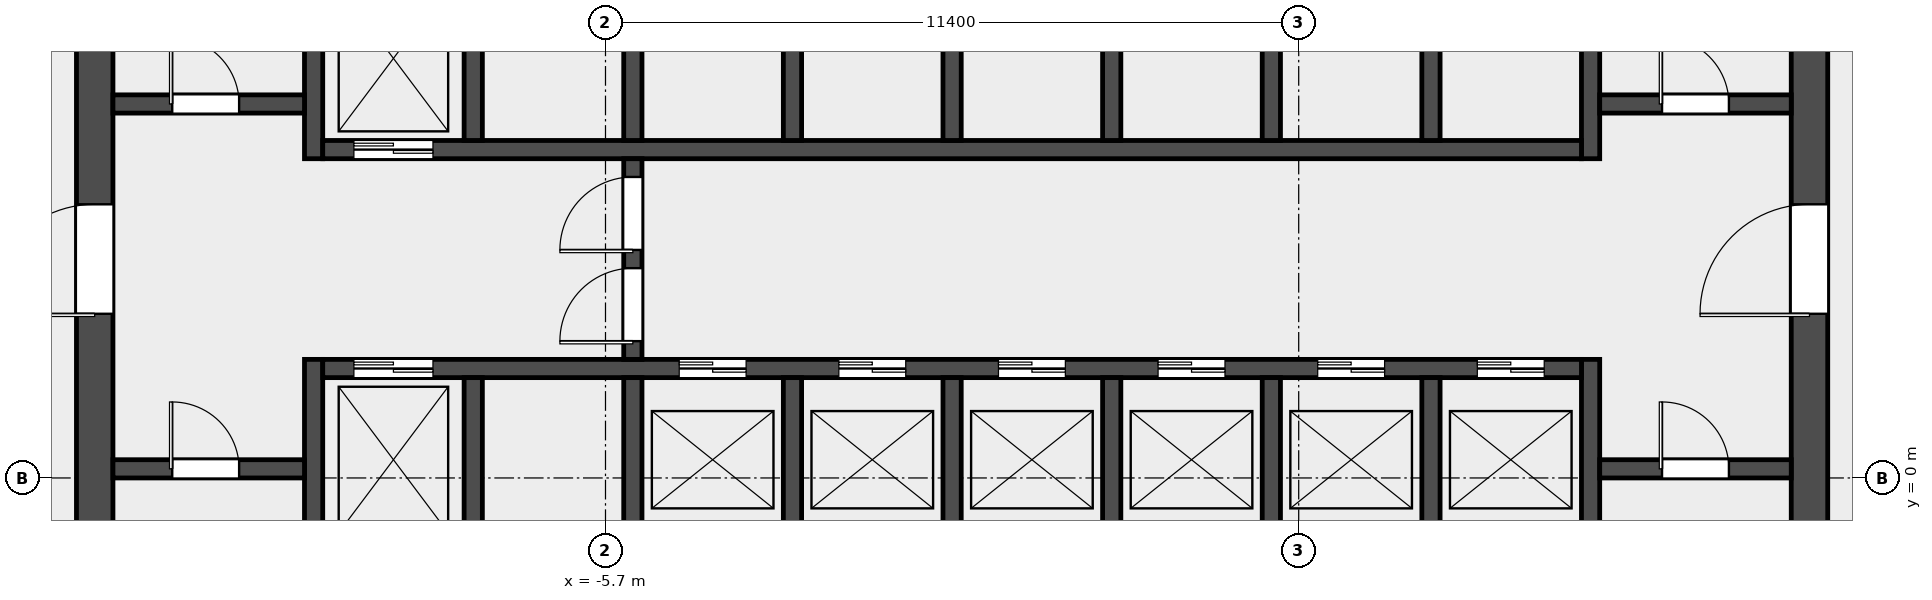
"""IFC4 building model, lengths in metres.
Left out: names, types, materials, properties, quantities, classifications, styles, units other than length and angle.
Written with IfcOpenShell. Run it as: python <this file> out.ifc"""

import sys

from ifc_helpers import new_model, si_unit, direction, frame, frame_2d, origin, place, context, subcontext, project, spatial, rectangle, extrude, element, fill, save


model = new_model("IFC4")
c1 = context("Model", 3, precision=1e-05, world=origin(), true_north=direction((0.0, 1.0)))
c2 = subcontext(c1, "Body", "Model", "MODEL_VIEW")
j1 = project(units=[si_unit("LENGTHUNIT", "METRE"), si_unit("PLANEANGLEUNIT", "RADIAN")], contexts=[c1])
p1 = place(None, origin())
s1 = spatial("IfcSite", under=j1, at=p1, CompositionType="ELEMENT")
p2 = place(p1, origin())
s2 = spatial("IfcBuilding", under=s1, at=p2, CompositionType="ELEMENT")
p3 = place(p2, frame((0.0, 0.0, 59.8)))
s3 = spatial("IfcBuildingStorey", under=s2, at=p3, CompositionType="ELEMENT", Elevation=59.8)
p4 = place(p3, frame((-14.1, -6.6, 0.0), z_axis=(0.0, 0.0, 1.0), x_axis=(0.0, 1.0, 0.0)))
e1 = element("IfcWall", 1, at=p4, inside=s3, PredefinedType="SHEAR", context=c2, shape_type="SweptSolid", body=[
    extrude(rectangle(XDim=19.5, YDim=0.6, at=frame_2d((9.75, 0.0))), origin(), (0.0, 0.0, 1.0), 4.5),
])
p5 = place(p4, frame((9.3, 0.0, 0.0)))
e2 = element("IfcOpeningElement", 2, at=p5, cuts=e1, PredefinedType="OPENING", context=c2, shape_type="SweptSolid", body=[
    extrude(rectangle(XDim=1.8, YDim=2.1, at=frame_2d((0.9, 1.05))), frame((0.0, 0.312, 0.0), z_axis=(0.0, -1.0, 0.0), x_axis=(1.0, 0.0, 0.0)), (0.0, 0.0, 1.0), 0.624),
])
p6 = place(p3, frame((14.1, -6.6, 0.0), z_axis=(0.0, 0.0, 1.0), x_axis=(0.0, 1.0, 0.0)))
e3 = element("IfcWall", 3, at=p6, inside=s3, PredefinedType="SHEAR", context=c2, shape_type="SweptSolid", body=[
    extrude(rectangle(XDim=19.5, YDim=0.6, at=frame_2d((9.75, 0.0))), origin(), (0.0, 0.0, 1.0), 4.5),
])
p7 = place(p6, frame((9.3, 0.0, 0.0)))
e4 = element("IfcOpeningElement", 4, at=p7, cuts=e3, PredefinedType="OPENING", context=c2, shape_type="SweptSolid", body=[
    extrude(rectangle(XDim=1.8, YDim=2.1, at=frame_2d((0.9, 1.05))), frame((0.0, 0.312, 0.0), z_axis=(0.0, -1.0, 0.0), x_axis=(1.0, 0.0, 0.0)), (0.0, 0.0, 1.0), 0.624),
])
p8 = place(p3, frame((-10.5, -6.6, 0.0), z_axis=(0.0, 0.0, 1.0), x_axis=(0.0, 1.0, 0.0)))
e5 = element("IfcWall", 5, at=p8, inside=s3, PredefinedType="SHEAR", context=c2, shape_type="SweptSolid", body=[
    extrude(rectangle(XDim=8.55, YDim=0.3, at=frame_2d((4.275, 0.0))), origin(), (0.0, 0.0, 1.0), 4.5),
])
p9 = place(p3, frame((-10.5, 5.25, 0.0), z_axis=(0.0, 0.0, 1.0), x_axis=(0.0, 1.0, 0.0)))
e6 = element("IfcWall", 6, at=p9, inside=s3, PredefinedType="SHEAR", context=c2, shape_type="SweptSolid", body=[
    extrude(rectangle(XDim=7.65, YDim=0.3, at=frame_2d((3.825, 0.0))), origin(), (0.0, 0.0, 1.0), 4.5),
])
p10 = place(p3, frame((10.5, -6.6, 0.0), z_axis=(0.0, 0.0, 1.0), x_axis=(0.0, 1.0, 0.0)))
e7 = element("IfcWall", 7, at=p10, inside=s3, PredefinedType="SHEAR", context=c2, shape_type="SweptSolid", body=[
    extrude(rectangle(XDim=8.55, YDim=0.3, at=frame_2d((4.275, 0.0))), origin(), (0.0, 0.0, 1.0), 4.5),
])
p11 = place(p3, frame((10.5, 5.25, 0.0), z_axis=(0.0, 0.0, 1.0), x_axis=(0.0, 1.0, 0.0)))
e8 = element("IfcWall", 8, at=p11, inside=s3, PredefinedType="SHEAR", context=c2, shape_type="SweptSolid", body=[
    extrude(rectangle(XDim=7.65, YDim=0.3, at=frame_2d((3.825, 0.0))), origin(), (0.0, 0.0, 1.0), 4.5),
])
p12 = place(p3, frame((-13.8, 0.15, 0.0), z_axis=(0.0, 0.0, 1.0), x_axis=(1.0, 0.0, 0.0)))
e9 = element("IfcWall", 9, at=p12, inside=s3, PredefinedType="SOLIDWALL", context=c2, shape_type="SweptSolid", body=[
    extrude(rectangle(XDim=3.15, YDim=0.3, at=frame_2d((1.575, 0.0))), origin(), (0.0, 0.0, 1.0), 4.5),
])
p13 = place(p12, frame((0.975, 0.0, 0.0)))
e10 = element("IfcOpeningElement", 10, at=p13, cuts=e9, PredefinedType="OPENING", context=c2, shape_type="SweptSolid", body=[
    extrude(rectangle(XDim=1.1, YDim=2.1, at=frame_2d((0.55, 1.05))), frame((0.0, 0.162, 0.0), z_axis=(0.0, -1.0, 0.0), x_axis=(1.0, 0.0, 0.0)), (0.0, 0.0, 1.0), 0.324),
])
p14 = place(p3, frame((-13.8, 6.15, 0.0), z_axis=(0.0, 0.0, 1.0), x_axis=(1.0, 0.0, 0.0)))
e11 = element("IfcWall", 11, at=p14, inside=s3, PredefinedType="SOLIDWALL", context=c2, shape_type="SweptSolid", body=[
    extrude(rectangle(XDim=3.15, YDim=0.3, at=frame_2d((1.575, 0.0))), origin(), (0.0, 0.0, 1.0), 4.5),
])
p15 = place(p14, frame((0.975, 0.0, 0.0)))
e12 = element("IfcOpeningElement", 12, at=p15, cuts=e11, PredefinedType="OPENING", context=c2, shape_type="SweptSolid", body=[
    extrude(rectangle(XDim=1.1, YDim=2.1, at=frame_2d((0.55, 1.05))), frame((0.0, 0.162, 0.0), z_axis=(0.0, -1.0, 0.0), x_axis=(1.0, 0.0, 0.0)), (0.0, 0.0, 1.0), 0.324),
])
p16 = place(p3, frame((10.65, 0.15, 0.0), z_axis=(0.0, 0.0, 1.0), x_axis=(1.0, 0.0, 0.0)))
e13 = element("IfcWall", 13, at=p16, inside=s3, PredefinedType="SOLIDWALL", context=c2, shape_type="SweptSolid", body=[
    extrude(rectangle(XDim=3.15, YDim=0.3, at=frame_2d((1.575, 0.0))), origin(), (0.0, 0.0, 1.0), 4.5),
])
p17 = place(p16, frame((1.025, 0.0, 0.0)))
e14 = element("IfcOpeningElement", 14, at=p17, cuts=e13, PredefinedType="OPENING", context=c2, shape_type="SweptSolid", body=[
    extrude(rectangle(XDim=1.1, YDim=2.1, at=frame_2d((0.55, 1.05))), frame((0.0, 0.162, 0.0), z_axis=(0.0, -1.0, 0.0), x_axis=(1.0, 0.0, 0.0)), (0.0, 0.0, 1.0), 0.324),
])
p18 = place(p3, frame((10.65, 6.15, 0.0), z_axis=(0.0, 0.0, 1.0), x_axis=(1.0, 0.0, 0.0)))
e15 = element("IfcWall", 15, at=p18, inside=s3, PredefinedType="SOLIDWALL", context=c2, shape_type="SweptSolid", body=[
    extrude(rectangle(XDim=3.15, YDim=0.3, at=frame_2d((1.575, 0.0))), origin(), (0.0, 0.0, 1.0), 4.5),
])
p19 = place(p18, frame((1.025, 0.0, 0.0)))
e16 = element("IfcOpeningElement", 16, at=p19, cuts=e15, PredefinedType="OPENING", context=c2, shape_type="SweptSolid", body=[
    extrude(rectangle(XDim=1.1, YDim=2.1, at=frame_2d((0.55, 1.05))), frame((0.0, 0.162, 0.0), z_axis=(0.0, -1.0, 0.0), x_axis=(1.0, 0.0, 0.0)), (0.0, 0.0, 1.0), 0.324),
])
p20 = place(p3, frame((-10.35, 1.8, 0.0), z_axis=(0.0, 0.0, 1.0), x_axis=(1.0, 0.0, 0.0)))
e17 = element("IfcWall", 17, at=p20, inside=s3, PredefinedType="SOLIDWALL", context=c2, shape_type="SweptSolid", body=[
    extrude(rectangle(XDim=20.7, YDim=0.3, at=frame_2d((10.35, 0.0))), origin(), (0.0, 0.0, 1.0), 4.5),
])
p21 = place(p20, frame((0.512, 0.0, 0.0)))
e18 = element("IfcOpeningElement", 18, at=p21, cuts=e17, PredefinedType="OPENING", context=c2, shape_type="SweptSolid", body=[
    extrude(rectangle(XDim=1.3, YDim=2.1, at=frame_2d((0.65, 1.05))), frame((0.0, 0.162, 0.0), z_axis=(0.0, -1.0, 0.0), x_axis=(1.0, 0.0, 0.0)), (0.0, 0.0, 1.0), 0.324),
])
p22 = place(p20, frame((5.863, 0.0, 0.0)))
e19 = element("IfcOpeningElement", 19, at=p22, cuts=e17, PredefinedType="OPENING", context=c2, shape_type="SweptSolid", body=[
    extrude(rectangle(XDim=1.1, YDim=2.1, at=frame_2d((0.55, 1.05))), frame((0.0, 0.162, 0.0), z_axis=(0.0, -1.0, 0.0), x_axis=(1.0, 0.0, 0.0)), (0.0, 0.0, 1.0), 0.324),
])
p23 = place(p20, frame((8.488, 0.0, 0.0)))
e20 = element("IfcOpeningElement", 20, at=p23, cuts=e17, PredefinedType="OPENING", context=c2, shape_type="SweptSolid", body=[
    extrude(rectangle(XDim=1.1, YDim=2.1, at=frame_2d((0.55, 1.05))), frame((0.0, 0.162, 0.0), z_axis=(0.0, -1.0, 0.0), x_axis=(1.0, 0.0, 0.0)), (0.0, 0.0, 1.0), 0.324),
])
p24 = place(p20, frame((11.113, 0.0, 0.0)))
e21 = element("IfcOpeningElement", 21, at=p24, cuts=e17, PredefinedType="OPENING", context=c2, shape_type="SweptSolid", body=[
    extrude(rectangle(XDim=1.1, YDim=2.1, at=frame_2d((0.55, 1.05))), frame((0.0, 0.162, 0.0), z_axis=(0.0, -1.0, 0.0), x_axis=(1.0, 0.0, 0.0)), (0.0, 0.0, 1.0), 0.324),
])
p25 = place(p20, frame((13.738, 0.0, 0.0)))
e22 = element("IfcOpeningElement", 22, at=p25, cuts=e17, PredefinedType="OPENING", context=c2, shape_type="SweptSolid", body=[
    extrude(rectangle(XDim=1.1, YDim=2.1, at=frame_2d((0.55, 1.05))), frame((0.0, 0.162, 0.0), z_axis=(0.0, -1.0, 0.0), x_axis=(1.0, 0.0, 0.0)), (0.0, 0.0, 1.0), 0.324),
])
p26 = place(p20, frame((16.363, 0.0, 0.0)))
e23 = element("IfcOpeningElement", 23, at=p26, cuts=e17, PredefinedType="OPENING", context=c2, shape_type="SweptSolid", body=[
    extrude(rectangle(XDim=1.1, YDim=2.1, at=frame_2d((0.55, 1.05))), frame((0.0, 0.162, 0.0), z_axis=(0.0, -1.0, 0.0), x_axis=(1.0, 0.0, 0.0)), (0.0, 0.0, 1.0), 0.324),
])
p27 = place(p20, frame((18.988, 0.0, 0.0)))
e24 = element("IfcOpeningElement", 24, at=p27, cuts=e17, PredefinedType="OPENING", context=c2, shape_type="SweptSolid", body=[
    extrude(rectangle(XDim=1.1, YDim=2.1, at=frame_2d((0.55, 1.05))), frame((0.0, 0.162, 0.0), z_axis=(0.0, -1.0, 0.0), x_axis=(1.0, 0.0, 0.0)), (0.0, 0.0, 1.0), 0.324),
])
p28 = place(p3, frame((-10.35, 5.4, 0.0), z_axis=(0.0, 0.0, 1.0), x_axis=(1.0, 0.0, 0.0)))
e25 = element("IfcWall", 25, at=p28, inside=s3, PredefinedType="SOLIDWALL", context=c2, shape_type="SweptSolid", body=[
    extrude(rectangle(XDim=20.7, YDim=0.3, at=frame_2d((10.35, 0.0))), origin(), (0.0, 0.0, 1.0), 4.5),
])
p29 = place(p28, frame((0.512, 0.0, 0.0)))
e26 = element("IfcOpeningElement", 26, at=p29, cuts=e25, PredefinedType="OPENING", context=c2, shape_type="SweptSolid", body=[
    extrude(rectangle(XDim=1.3, YDim=2.1, at=frame_2d((0.65, 1.05))), frame((0.0, 0.162, 0.0), z_axis=(0.0, -1.0, 0.0), x_axis=(1.0, 0.0, 0.0)), (0.0, 0.0, 1.0), 0.324),
])
for number, where, z_axis, x_axis in (
    (27, (-7.875, -1.05, 0.0), (0.0, 0.0, 1.0), (0.0, 1.0, 0.0)),
    (28, (-5.25, -1.05, 0.0), (0.0, 0.0, 1.0), (0.0, 1.0, 0.0)),
    (29, (-2.625, -1.05, 0.0), (0.0, 0.0, 1.0), (0.0, 1.0, 0.0)),
    (30, (0.0, -1.05, 0.0), (0.0, 0.0, 1.0), (0.0, 1.0, 0.0)),
    (31, (2.625, -1.05, 0.0), (0.0, 0.0, 1.0), (0.0, 1.0, 0.0)),
    (32, (5.25, -1.05, 0.0), (0.0, 0.0, 1.0), (0.0, 1.0, 0.0)),
    (33, (7.875, -1.05, 0.0), (0.0, 0.0, 1.0), (0.0, 1.0, 0.0)),
    (34, (-7.875, 5.55, 0.0), (0.0, 0.0, 1.0), (0.0, 1.0, 0.0)),
    (35, (-5.25, 5.55, 0.0), (0.0, 0.0, 1.0), (0.0, 1.0, 0.0)),
    (36, (-2.625, 5.55, 0.0), (0.0, 0.0, 1.0), (0.0, 1.0, 0.0)),
    (37, (0.0, 5.55, 0.0), (0.0, 0.0, 1.0), (0.0, 1.0, 0.0)),
    (38, (2.625, 5.55, 0.0), (0.0, 0.0, 1.0), (0.0, 1.0, 0.0)),
    (39, (5.25, 5.55, 0.0), (0.0, 0.0, 1.0), (0.0, 1.0, 0.0)),
    (40, (7.875, 5.55, 0.0), (0.0, 0.0, 1.0), (0.0, 1.0, 0.0)),
):
    element("IfcWall", number, at=place(p3, frame(where, z_axis=z_axis, x_axis=x_axis)), inside=s3, PredefinedType="SOLIDWALL", context=c2, shape_type="SweptSolid", body=[
        extrude(rectangle(XDim=2.7, YDim=0.3, at=frame_2d((1.35, 0.0))), origin(), (0.0, 0.0, 1.0), 4.5),
    ])
p30 = place(p3, frame((-5.25, 1.95, 0.0), z_axis=(0.0, 0.0, 1.0), x_axis=(0.0, 1.0, 0.0)))
e41 = element("IfcWall", 41, at=p30, inside=s3, PredefinedType="SOLIDWALL", context=c2, shape_type="SweptSolid", body=[
    extrude(rectangle(XDim=3.3, YDim=0.3, at=frame_2d((1.65, 0.0))), origin(), (0.0, 0.0, 1.0), 4.5),
])
p31 = place(p30, frame((0.3, 0.0, 0.0)))
e42 = element("IfcOpeningElement", 42, at=p31, cuts=e41, PredefinedType="OPENING", context=c2, shape_type="SweptSolid", body=[
    extrude(rectangle(XDim=1.2, YDim=2.1, at=frame_2d((0.6, 1.05))), frame((0.0, 0.162, 0.0), z_axis=(0.0, -1.0, 0.0), x_axis=(1.0, 0.0, 0.0)), (0.0, 0.0, 1.0), 0.324),
])
p32 = place(p30, frame((1.8, 0.0, 0.0)))
e43 = element("IfcOpeningElement", 43, at=p32, cuts=e41, PredefinedType="OPENING", context=c2, shape_type="SweptSolid", body=[
    extrude(rectangle(XDim=1.2, YDim=2.1, at=frame_2d((0.6, 1.05))), frame((0.0, 0.162, 0.0), z_axis=(0.0, -1.0, 0.0), x_axis=(1.0, 0.0, 0.0)), (0.0, 0.0, 1.0), 0.324),
])
p33 = place(p13, origin())
e44 = element("IfcDoor", 44, at=p33, inside=s3, OperationType="SINGLE_SWING_LEFT", PredefinedType="DOOR", context=c2, shape_type="SweptSolid", body=[
    extrude(rectangle(XDim=1.1, YDim=2.1, at=frame_2d((0.55, 1.05))), frame((0.0, 0.025, 0.0), z_axis=(0.0, -1.0, 0.0), x_axis=(1.0, 0.0, 0.0)), (0.0, 0.0, 1.0), 0.05),
])
fill(e10, e44)
p34 = place(p15, origin())
e45 = element("IfcDoor", 45, at=p34, inside=s3, OperationType="SINGLE_SWING_LEFT", PredefinedType="DOOR", context=c2, shape_type="SweptSolid", body=[
    extrude(rectangle(XDim=1.1, YDim=2.1, at=frame_2d((0.55, 1.05))), frame((0.0, 0.025, 0.0), z_axis=(0.0, -1.0, 0.0), x_axis=(1.0, 0.0, 0.0)), (0.0, 0.0, 1.0), 0.05),
])
fill(e12, e45)
p35 = place(p17, origin())
e46 = element("IfcDoor", 46, at=p35, inside=s3, OperationType="SINGLE_SWING_RIGHT", PredefinedType="DOOR", context=c2, shape_type="SweptSolid", body=[
    extrude(rectangle(XDim=1.1, YDim=2.1, at=frame_2d((0.55, 1.05))), frame((0.0, 0.025, 0.0), z_axis=(0.0, -1.0, 0.0), x_axis=(1.0, 0.0, 0.0)), (0.0, 0.0, 1.0), 0.05),
])
fill(e14, e46)
p36 = place(p19, origin())
e47 = element("IfcDoor", 47, at=p36, inside=s3, OperationType="SINGLE_SWING_RIGHT", PredefinedType="DOOR", context=c2, shape_type="SweptSolid", body=[
    extrude(rectangle(XDim=1.1, YDim=2.1, at=frame_2d((0.55, 1.05))), frame((0.0, 0.025, 0.0), z_axis=(0.0, -1.0, 0.0), x_axis=(1.0, 0.0, 0.0)), (0.0, 0.0, 1.0), 0.05),
])
fill(e16, e47)
p37 = place(p5, origin())
e48 = element("IfcDoor", 48, at=p37, inside=s3, OperationType="DOUBLE_DOOR_SINGLE_SWING", PredefinedType="DOOR", context=c2, shape_type="SweptSolid", body=[
    extrude(rectangle(XDim=1.8, YDim=2.1, at=frame_2d((0.9, 1.05))), frame((0.0, 0.025, 0.0), z_axis=(0.0, -1.0, 0.0), x_axis=(1.0, 0.0, 0.0)), (0.0, 0.0, 1.0), 0.05),
])
fill(e2, e48)
p38 = place(p7, origin())
e49 = element("IfcDoor", 49, at=p38, inside=s3, OperationType="DOUBLE_DOOR_SINGLE_SWING", PredefinedType="DOOR", context=c2, shape_type="SweptSolid", body=[
    extrude(rectangle(XDim=1.8, YDim=2.1, at=frame_2d((0.9, 1.05))), frame((0.0, 0.025, 0.0), z_axis=(0.0, -1.0, 0.0), x_axis=(1.0, 0.0, 0.0)), (0.0, 0.0, 1.0), 0.05),
])
fill(e4, e49)
p39 = place(p31, origin())
e50 = element("IfcDoor", 50, at=p39, inside=s3, OperationType="SINGLE_SWING_LEFT", PredefinedType="DOOR", context=c2, shape_type="SweptSolid", body=[
    extrude(rectangle(XDim=1.2, YDim=2.1, at=frame_2d((0.6, 1.05))), frame((0.0, 0.025, 0.0), z_axis=(0.0, -1.0, 0.0), x_axis=(1.0, 0.0, 0.0)), (0.0, 0.0, 1.0), 0.05),
])
fill(e42, e50)
p40 = place(p32, origin())
e51 = element("IfcDoor", 51, at=p40, inside=s3, OperationType="SINGLE_SWING_RIGHT", PredefinedType="DOOR", context=c2, shape_type="SweptSolid", body=[
    extrude(rectangle(XDim=1.2, YDim=2.1, at=frame_2d((0.6, 1.05))), frame((0.0, 0.025, 0.0), z_axis=(0.0, -1.0, 0.0), x_axis=(1.0, 0.0, 0.0)), (0.0, 0.0, 1.0), 0.05),
])
fill(e43, e51)
p41 = place(p21, origin())
e52 = element("IfcDoor", 52, at=p41, inside=s3, OperationType="DOUBLE_DOOR_SLIDING", PredefinedType="DOOR", context=c2, shape_type="SweptSolid", body=[
    extrude(rectangle(XDim=1.3, YDim=2.1, at=frame_2d((0.65, 1.05))), frame((0.0, 0.025, 0.0), z_axis=(0.0, -1.0, 0.0), x_axis=(1.0, 0.0, 0.0)), (0.0, 0.0, 1.0), 0.05),
])
fill(e18, e52)
p42 = place(p22, origin())
e53 = element("IfcDoor", 53, at=p42, inside=s3, OperationType="DOUBLE_DOOR_SLIDING", PredefinedType="DOOR", context=c2, shape_type="SweptSolid", body=[
    extrude(rectangle(XDim=1.1, YDim=2.1, at=frame_2d((0.55, 1.05))), frame((0.0, 0.025, 0.0), z_axis=(0.0, -1.0, 0.0), x_axis=(1.0, 0.0, 0.0)), (0.0, 0.0, 1.0), 0.05),
])
fill(e19, e53)
p43 = place(p23, origin())
e54 = element("IfcDoor", 54, at=p43, inside=s3, OperationType="DOUBLE_DOOR_SLIDING", PredefinedType="DOOR", context=c2, shape_type="SweptSolid", body=[
    extrude(rectangle(XDim=1.1, YDim=2.1, at=frame_2d((0.55, 1.05))), frame((0.0, 0.025, 0.0), z_axis=(0.0, -1.0, 0.0), x_axis=(1.0, 0.0, 0.0)), (0.0, 0.0, 1.0), 0.05),
])
fill(e20, e54)
p44 = place(p24, origin())
e55 = element("IfcDoor", 55, at=p44, inside=s3, OperationType="DOUBLE_DOOR_SLIDING", PredefinedType="DOOR", context=c2, shape_type="SweptSolid", body=[
    extrude(rectangle(XDim=1.1, YDim=2.1, at=frame_2d((0.55, 1.05))), frame((0.0, 0.025, 0.0), z_axis=(0.0, -1.0, 0.0), x_axis=(1.0, 0.0, 0.0)), (0.0, 0.0, 1.0), 0.05),
])
fill(e21, e55)
p45 = place(p25, origin())
e56 = element("IfcDoor", 56, at=p45, inside=s3, OperationType="DOUBLE_DOOR_SLIDING", PredefinedType="DOOR", context=c2, shape_type="SweptSolid", body=[
    extrude(rectangle(XDim=1.1, YDim=2.1, at=frame_2d((0.55, 1.05))), frame((0.0, 0.025, 0.0), z_axis=(0.0, -1.0, 0.0), x_axis=(1.0, 0.0, 0.0)), (0.0, 0.0, 1.0), 0.05),
])
fill(e22, e56)
p46 = place(p26, origin())
e57 = element("IfcDoor", 57, at=p46, inside=s3, OperationType="DOUBLE_DOOR_SLIDING", PredefinedType="DOOR", context=c2, shape_type="SweptSolid", body=[
    extrude(rectangle(XDim=1.1, YDim=2.1, at=frame_2d((0.55, 1.05))), frame((0.0, 0.025, 0.0), z_axis=(0.0, -1.0, 0.0), x_axis=(1.0, 0.0, 0.0)), (0.0, 0.0, 1.0), 0.05),
])
fill(e23, e57)
p47 = place(p27, origin())
e58 = element("IfcDoor", 58, at=p47, inside=s3, OperationType="DOUBLE_DOOR_SLIDING", PredefinedType="DOOR", context=c2, shape_type="SweptSolid", body=[
    extrude(rectangle(XDim=1.1, YDim=2.1, at=frame_2d((0.55, 1.05))), frame((0.0, 0.025, 0.0), z_axis=(0.0, -1.0, 0.0), x_axis=(1.0, 0.0, 0.0)), (0.0, 0.0, 1.0), 0.05),
])
fill(e24, e58)
p48 = place(p29, origin())
e59 = element("IfcDoor", 59, at=p48, inside=s3, OperationType="DOUBLE_DOOR_SLIDING", PredefinedType="DOOR", context=c2, shape_type="SweptSolid", body=[
    extrude(rectangle(XDim=1.3, YDim=2.1, at=frame_2d((0.65, 1.05))), frame((0.0, 0.025, 0.0), z_axis=(0.0, -1.0, 0.0), x_axis=(1.0, 0.0, 0.0)), (0.0, 0.0, 1.0), 0.05),
])
fill(e26, e59)
save(model, sys.argv[1])
